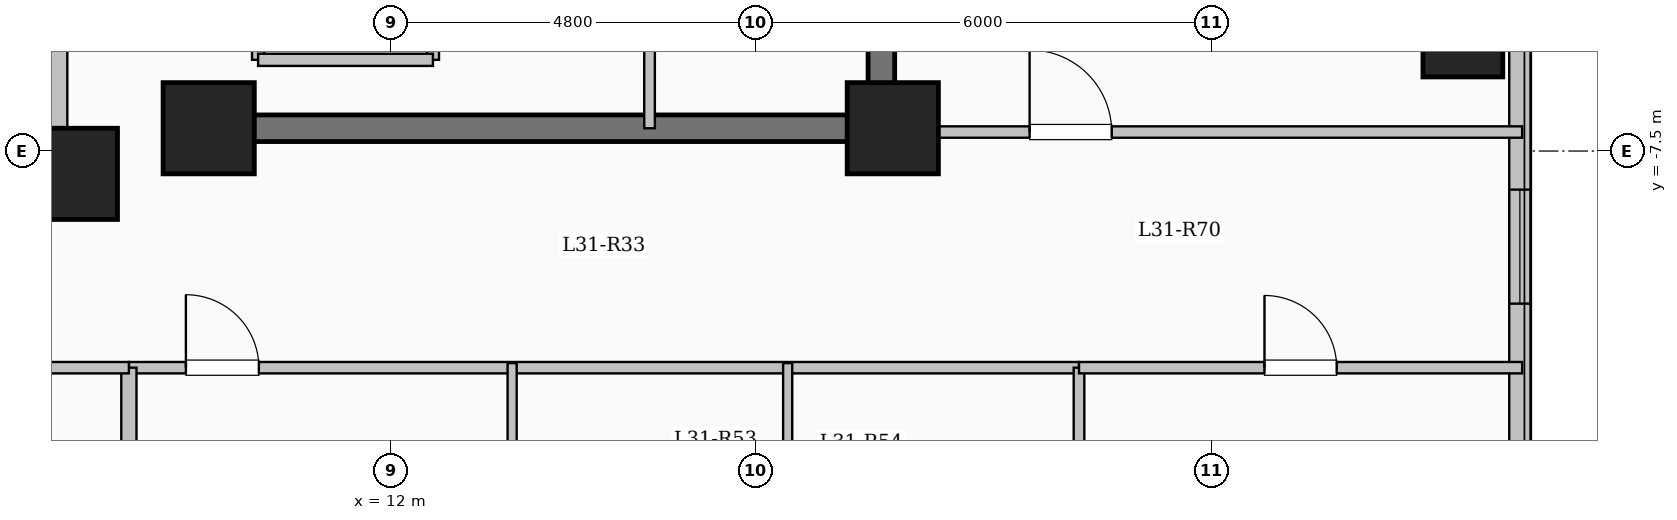
"""IFC4 building model, lengths in metres.
Left out: names, types, materials, properties, quantities, classifications, styles, units other than length and angle.
Written with IfcOpenShell. Run it as: python <this file> out.ifc"""

import sys

from ifc_helpers import new_model, si_unit, direction, frame, frame_2d, origin, origin_2d, place, context, subcontext, project, spatial, rectangle, extrude, element, fill, save


model = new_model("IFC4")
c1 = context("Model", 3, precision=1e-05, world=origin(), true_north=direction((0.0, 1.0)))
c2 = subcontext(c1, "Body", "Model", "MODEL_VIEW")
j1 = project(units=[si_unit("LENGTHUNIT", "METRE"), si_unit("PLANEANGLEUNIT", "RADIAN")], contexts=[c1])
p1 = place(None, origin())
s1 = spatial("IfcSite", under=j1, at=p1, CompositionType="ELEMENT")
p2 = place(p1, origin())
s2 = spatial("IfcBuilding", under=s1, at=p2, CompositionType="ELEMENT")
p3 = place(p2, frame((0.0, 0.0, 115.15)))
s3 = spatial("IfcBuildingStorey", under=s2, at=p3, CompositionType="ELEMENT", Elevation=115.15)
for number, where, z_axis, x_axis in (
    (1, (7.8, -7.8, 0.0), (0.0, 0.0, 1.0), (1.0, 0.0, 0.0)),
    (2, (9.6, -7.2, 0.0), (0.0, 0.0, 1.0), (1.0, 0.0, 0.0)),
    (3, (18.6, -7.2, 0.0), (0.0, 0.0, 1.0), (1.0, 0.0, 0.0)),
):
    element("IfcColumn", number, at=place(p3, frame(where, z_axis=z_axis, x_axis=x_axis)), inside=s3, PredefinedType="COLUMN", context=c2, shape_type="SweptSolid", body=[
        extrude(rectangle(XDim=1.2, YDim=1.2, at=origin_2d()), origin(), (0.0, 0.0, 1.0), 3.35),
    ])
p4 = place(p3, frame((26.1, -6.0, 0.0), z_axis=(0.0, 0.0, 1.0), x_axis=(1.0, 0.0, 0.0)))
e4 = element("IfcColumn", 4, at=p4, inside=s3, PredefinedType="COLUMN", context=c2, shape_type="SweptSolid", body=[
    extrude(rectangle(XDim=1.05, YDim=1.05, at=origin_2d()), origin(), (0.0, 0.0, 1.0), 3.35),
])
p5 = place(p3, frame((-7.62, -7.62, 0.0), z_axis=(0.0, 0.0, 1.0), x_axis=(1.0, 0.0, 0.0)))
e5 = element("IfcWall", 5, at=p5, inside=s3, PredefinedType="SOLIDWALL", context=c2, shape_type="SweptSolid", body=[
    extrude(rectangle(XDim=15.24, YDim=0.24, at=frame_2d((7.62, 0.0))), origin(), (0.0, 0.0, 1.0), 3.05),
])
p6 = place(p5, frame((6.92, 0.0, 0.95)))
e6 = element("IfcOpeningElement", 6, at=p6, cuts=e5, PredefinedType="OPENING", context=c2, shape_type="SweptSolid", body=[
    extrude(rectangle(XDim=1.4, YDim=1.5, at=frame_2d((0.7, 0.75))), frame((0.0, 0.13, 0.0), z_axis=(0.0, -1.0, 0.0), x_axis=(1.0, 0.0, 0.0)), (0.0, 0.0, 1.0), 0.26),
])
p7 = place(p3, frame((7.62, -7.62, 0.0), z_axis=(0.0, 0.0, 1.0), x_axis=(0.0, 1.0, 0.0)))
e7 = element("IfcWall", 7, at=p7, inside=s3, PredefinedType="SOLIDWALL", context=c2, shape_type="SweptSolid", body=[
    extrude(rectangle(XDim=15.24, YDim=0.24, at=frame_2d((7.62, 0.0))), origin(), (0.0, 0.0, 1.0), 3.05),
])
p8 = place(p7, frame((6.92, 0.0, 0.95)))
e8 = element("IfcOpeningElement", 8, at=p8, cuts=e7, PredefinedType="OPENING", context=c2, shape_type="SweptSolid", body=[
    extrude(rectangle(XDim=1.4, YDim=1.5, at=frame_2d((0.7, 0.75))), frame((0.0, 0.13, 0.0), z_axis=(0.0, -1.0, 0.0), x_axis=(1.0, 0.0, 0.0)), (0.0, 0.0, 1.0), 0.26),
])
p9 = place(p3, frame((26.85, 17.85, 0.0), z_axis=(0.0, 0.0, 1.0), x_axis=(0.0, -1.0, 0.0)))
e9 = element("IfcWall", 9, at=p9, inside=s3, PredefinedType="SOLIDWALL", context=c2, shape_type="SweptSolid", body=[
    extrude(rectangle(XDim=35.7, YDim=0.28, at=frame_2d((17.85, 0.0))), origin(), (0.0, 0.0, 1.0), 3.05),
])
p10 = place(p9, frame((1.675, 0.0, 0.9)))
e10 = element("IfcOpeningElement", 10, at=p10, cuts=e9, PredefinedType="OPENING", context=c2, shape_type="SweptSolid", body=[
    extrude(rectangle(XDim=2.0, YDim=1.7, at=frame_2d((1.0, 0.85))), frame((0.0, 0.15, 0.0), z_axis=(0.0, -1.0, 0.0), x_axis=(1.0, 0.0, 0.0)), (0.0, 0.0, 1.0), 0.3),
])
p11 = place(p9, frame((5.725, 0.0, 0.95)))
e11 = element("IfcOpeningElement", 11, at=p11, cuts=e9, PredefinedType="OPENING", context=c2, shape_type="SweptSolid", body=[
    extrude(rectangle(XDim=1.0, YDim=1.5, at=frame_2d((0.5, 0.75))), frame((0.0, 0.15, 0.0), z_axis=(0.0, -1.0, 0.0), x_axis=(1.0, 0.0, 0.0)), (0.0, 0.0, 1.0), 0.3),
])
p12 = place(p9, frame((15.1, 0.0, 0.9)))
e12 = element("IfcOpeningElement", 12, at=p12, cuts=e9, PredefinedType="OPENING", context=c2, shape_type="SweptSolid", body=[
    extrude(rectangle(XDim=2.0, YDim=1.7, at=frame_2d((1.0, 0.85))), frame((0.0, 0.15, 0.0), z_axis=(0.0, -1.0, 0.0), x_axis=(1.0, 0.0, 0.0)), (0.0, 0.0, 1.0), 0.3),
])
p13 = place(p9, frame((25.857, 0.0, 0.9)))
e13 = element("IfcOpeningElement", 13, at=p13, cuts=e9, PredefinedType="OPENING", context=c2, shape_type="SweptSolid", body=[
    extrude(rectangle(XDim=1.5, YDim=1.65, at=frame_2d((0.75, 0.825))), frame((0.0, 0.15, 0.0), z_axis=(0.0, -1.0, 0.0), x_axis=(1.0, 0.0, 0.0)), (0.0, 0.0, 1.0), 0.3),
])
p14 = place(p9, frame((30.75, 0.0, 0.9)))
e14 = element("IfcOpeningElement", 14, at=p14, cuts=e9, PredefinedType="OPENING", context=c2, shape_type="SweptSolid", body=[
    extrude(rectangle(XDim=2.4, YDim=1.8, at=frame_2d((1.2, 0.9))), frame((0.0, 0.15, 0.0), z_axis=(0.0, -1.0, 0.0), x_axis=(1.0, 0.0, 0.0)), (0.0, 0.0, 1.0), 0.3),
])
p15 = place(p3, frame((10.25, -6.3, 0.0), z_axis=(0.0, 0.0, 1.0), x_axis=(0.0, 1.0, 0.0)))
e15 = element("IfcWall", 15, at=p15, inside=s3, PredefinedType="SOLIDWALL", context=c2, shape_type="SweptSolid", body=[
    extrude(rectangle(XDim=2.6, YDim=0.16, at=frame_2d((1.3, 0.0))), origin(), (0.0, 0.0, 1.0), 3.05),
])
p16 = place(p15, frame((0.75, 0.0, 0.0)))
e16 = element("IfcOpeningElement", 16, at=p16, cuts=e15, PredefinedType="OPENING", context=c2, shape_type="SweptSolid", body=[
    extrude(rectangle(XDim=1.1, YDim=2.15, at=frame_2d((0.55, 1.075))), frame((0.0, 0.09, 0.0), z_axis=(0.0, -1.0, 0.0), x_axis=(1.0, 0.0, 0.0)), (0.0, 0.0, 1.0), 0.18),
])
p17 = place(p3, frame((12.55, -6.3, 0.0), z_axis=(0.0, 0.0, 1.0), x_axis=(0.0, 1.0, 0.0)))
e17 = element("IfcWall", 17, at=p17, inside=s3, PredefinedType="SOLIDWALL", context=c2, shape_type="SweptSolid", body=[
    extrude(rectangle(XDim=2.6, YDim=0.16, at=frame_2d((1.3, 0.0))), origin(), (0.0, 0.0, 1.0), 3.05),
])
p18 = place(p3, frame((10.25, -6.3, 0.0), z_axis=(0.0, 0.0, 1.0), x_axis=(1.0, 0.0, 0.0)))
e18 = element("IfcWall", 18, at=p18, inside=s3, PredefinedType="SOLIDWALL", context=c2, shape_type="SweptSolid", body=[
    extrude(rectangle(XDim=2.3, YDim=0.16, at=frame_2d((1.15, 0.0))), origin(), (0.0, 0.0, 1.0), 3.05),
])
p19 = place(p3, frame((18.45, -7.375, 0.0), z_axis=(0.0, 0.0, 1.0), x_axis=(0.0, 1.0, 0.0)))
e19 = element("IfcWall", 19, at=p19, inside=s3, PredefinedType="SHEAR", context=c2, shape_type="SweptSolid", body=[
    extrude(rectangle(XDim=14.05, YDim=0.35, at=frame_2d((7.025, 0.0))), origin(), (0.0, 0.0, 1.0), 3.35),
])
p20 = place(p3, frame((10.075, -7.2, 0.0), z_axis=(0.0, 0.0, 1.0), x_axis=(1.0, 0.0, 0.0)))
e20 = element("IfcWall", 20, at=p20, inside=s3, PredefinedType="SHEAR", context=c2, shape_type="SweptSolid", body=[
    extrude(rectangle(XDim=8.55, YDim=0.35, at=frame_2d((4.275, 0.0))), origin(), (0.0, 0.0, 1.0), 3.35),
])
p21 = place(p3, frame((15.4, -7.2, 0.0), z_axis=(0.0, 0.0, 1.0), x_axis=(0.0, 1.0, 0.0)))
e21 = element("IfcWall", 21, at=p21, inside=s3, PredefinedType="PARTITIONING", context=c2, shape_type="SweptSolid", body=[
    extrude(rectangle(XDim=10.45, YDim=0.14, at=frame_2d((5.225, 0.0))), origin(), (0.0, 0.0, 1.0), 3.05),
])
p22 = place(p21, frame((9.25, 0.0, 0.0)))
e22 = element("IfcOpeningElement", 22, at=p22, cuts=e21, PredefinedType="OPENING", context=c2, shape_type="SweptSolid", body=[
    extrude(rectangle(XDim=0.9, YDim=2.08, at=frame_2d((0.45, 1.04))), frame((0.0, 0.08, 0.0), z_axis=(0.0, -1.0, 0.0), x_axis=(1.0, 0.0, 0.0)), (0.0, 0.0, 1.0), 0.16),
])
p23 = place(p3, frame((8.55, -10.35, 0.0), z_axis=(0.0, 0.0, 1.0), x_axis=(1.0, 0.0, 0.0)))
e23 = element("IfcWall", 23, at=p23, inside=s3, PredefinedType="PARTITIONING", context=c2, shape_type="SweptSolid", body=[
    extrude(rectangle(XDim=12.5, YDim=0.15, at=frame_2d((6.25, 0.0))), origin(), (0.0, 0.0, 1.0), 3.05),
])
p24 = place(p23, frame((0.75, 0.0, 0.0)))
e24 = element("IfcOpeningElement", 24, at=p24, cuts=e23, PredefinedType="OPENING", context=c2, shape_type="SweptSolid", body=[
    extrude(rectangle(XDim=0.96, YDim=2.15, at=frame_2d((0.48, 1.075))), frame((0.0, 0.085, 0.0), z_axis=(0.0, -1.0, 0.0), x_axis=(1.0, 0.0, 0.0)), (0.0, 0.0, 1.0), 0.17),
])
p25 = place(p3, frame((13.592, -22.1, 0.0), z_axis=(0.0, 0.0, 1.0), x_axis=(0.0, 1.0, 0.0)))
e25 = element("IfcWall", 25, at=p25, inside=s3, PredefinedType="PARTITIONING", context=c2, shape_type="SweptSolid", body=[
    extrude(rectangle(XDim=11.81, YDim=0.12, at=frame_2d((5.905, 0.0))), origin(), (0.0, 0.0, 1.0), 3.05),
])
p26 = place(p25, frame((7.475, 0.0, 0.0)))
e26 = element("IfcOpeningElement", 26, at=p26, cuts=e25, PredefinedType="OPENING", context=c2, shape_type="SweptSolid", body=[
    extrude(rectangle(XDim=1.08, YDim=2.15, at=frame_2d((0.54, 1.075))), frame((0.0, 0.07, 0.0), z_axis=(0.0, -1.0, 0.0), x_axis=(1.0, 0.0, 0.0)), (0.0, 0.0, 1.0), 0.14),
])
p27 = place(p3, frame((17.217, -13.26, 0.0), z_axis=(0.0, 0.0, 1.0), x_axis=(0.0, 1.0, 0.0)))
e27 = element("IfcWall", 27, at=p27, inside=s3, PredefinedType="PARTITIONING", context=c2, shape_type="SweptSolid", body=[
    extrude(rectangle(XDim=2.97, YDim=0.12, at=frame_2d((1.485, 0.0))), origin(), (0.0, 0.0, 1.0), 3.05),
])
p28 = place(p3, frame((8.55, -22.704, 0.0), z_axis=(0.0, 0.0, 1.0), x_axis=(0.0, 1.0, 0.0)))
e28 = element("IfcWall", 28, at=p28, inside=s3, PredefinedType="SOLIDWALL", context=c2, shape_type="SweptSolid", body=[
    extrude(rectangle(XDim=12.354, YDim=0.2, at=frame_2d((6.177, 0.0))), origin(), (0.0, 0.0, 1.0), 3.05),
])
p29 = place(p3, frame((-8.55, -10.35, 0.0), z_axis=(0.0, 0.0, 1.0), x_axis=(1.0, 0.0, 0.0)))
e29 = element("IfcWall", 29, at=p29, inside=s3, PredefinedType="PARTITIONING", context=c2, shape_type="SweptSolid", body=[
    extrude(rectangle(XDim=17.1, YDim=0.15, at=frame_2d((8.55, 0.0))), origin(), (0.0, 0.0, 1.0), 3.05),
])
p30 = place(p29, frame((1.15, 0.0, 0.0)))
e30 = element("IfcOpeningElement", 30, at=p30, cuts=e29, PredefinedType="OPENING", context=c2, shape_type="SweptSolid", body=[
    extrude(rectangle(XDim=0.96, YDim=2.15, at=frame_2d((0.48, 1.075))), frame((0.0, 0.085, 0.0), z_axis=(0.0, -1.0, 0.0), x_axis=(1.0, 0.0, 0.0)), (0.0, 0.0, 1.0), 0.17),
])
p31 = place(p29, frame((10.5, 0.0, 0.0)))
e31 = element("IfcOpeningElement", 31, at=p31, cuts=e29, PredefinedType="OPENING", context=c2, shape_type="SweptSolid", body=[
    extrude(rectangle(XDim=0.96, YDim=2.15, at=frame_2d((0.48, 1.075))), frame((0.0, 0.085, 0.0), z_axis=(0.0, -1.0, 0.0), x_axis=(1.0, 0.0, 0.0)), (0.0, 0.0, 1.0), 0.17),
])
p32 = place(p3, frame((18.45, -7.25, 0.0), z_axis=(0.0, 0.0, 1.0), x_axis=(1.0, 0.0, 0.0)))
e32 = element("IfcWall", 32, at=p32, inside=s3, PredefinedType="PARTITIONING", context=c2, shape_type="SweptSolid", body=[
    extrude(rectangle(XDim=8.43, YDim=0.15, at=frame_2d((4.215, 0.0))), origin(), (0.0, 0.0, 1.0), 3.05),
])
p33 = place(p32, frame((1.95, 0.0, 0.0)))
e33 = element("IfcOpeningElement", 33, at=p33, cuts=e32, PredefinedType="OPENING", context=c2, shape_type="SweptSolid", body=[
    extrude(rectangle(XDim=1.08, YDim=2.15, at=frame_2d((0.54, 1.075))), frame((0.0, 0.085, 0.0), z_axis=(0.0, -1.0, 0.0), x_axis=(1.0, 0.0, 0.0)), (0.0, 0.0, 1.0), 0.17),
])
p34 = place(p3, frame((21.05, -17.85, 0.0), z_axis=(0.0, 0.0, 1.0), x_axis=(0.0, 1.0, 0.0)))
e34 = element("IfcWall", 34, at=p34, inside=s3, PredefinedType="PARTITIONING", context=c2, shape_type="SweptSolid", body=[
    extrude(rectangle(XDim=7.5, YDim=0.14, at=frame_2d((3.75, 0.0))), origin(), (0.0, 0.0, 1.0), 3.05),
])
p35 = place(p3, frame((21.05, -10.35, 0.0), z_axis=(0.0, 0.0, 1.0), x_axis=(1.0, 0.0, 0.0)))
e35 = element("IfcWall", 35, at=p35, inside=s3, PredefinedType="PARTITIONING", context=c2, shape_type="SweptSolid", body=[
    extrude(rectangle(XDim=5.83, YDim=0.15, at=frame_2d((2.915, 0.0))), origin(), (0.0, 0.0, 1.0), 3.05),
])
p36 = place(p35, frame((2.44, 0.0, 0.0)))
e36 = element("IfcOpeningElement", 36, at=p36, cuts=e35, PredefinedType="OPENING", context=c2, shape_type="SweptSolid", body=[
    extrude(rectangle(XDim=0.95, YDim=2.15, at=frame_2d((0.475, 1.075))), frame((0.0, 0.085, 0.0), z_axis=(0.0, -1.0, 0.0), x_axis=(1.0, 0.0, 0.0)), (0.0, 0.0, 1.0), 0.17),
])
p37 = place(p13, origin())
e37 = element("IfcWindow", 37, at=p37, inside=s3, PartitioningType="SINGLE_PANEL", PredefinedType="WINDOW", context=c2, shape_type="SweptSolid", body=[
    extrude(rectangle(XDim=1.5, YDim=1.65, at=frame_2d((0.75, 0.825))), frame((0.0, 0.03, 0.0), z_axis=(0.0, -1.0, 0.0), x_axis=(1.0, 0.0, 0.0)), (0.0, 0.0, 1.0), 0.06),
])
fill(e13, e37)
p38 = place(p24, origin())
e38 = element("IfcDoor", 38, at=p38, inside=s3, OperationType="SINGLE_SWING_LEFT", PredefinedType="DOOR", context=c2, shape_type="SweptSolid", body=[
    extrude(rectangle(XDim=0.96, YDim=2.15, at=frame_2d((0.48, 1.075))), frame((0.0, 0.025, 0.0), z_axis=(0.0, -1.0, 0.0), x_axis=(1.0, 0.0, 0.0)), (0.0, 0.0, 1.0), 0.05),
])
fill(e24, e38)
p39 = place(p36, origin())
e39 = element("IfcDoor", 39, at=p39, inside=s3, OperationType="SINGLE_SWING_LEFT", PredefinedType="DOOR", context=c2, shape_type="SweptSolid", body=[
    extrude(rectangle(XDim=0.95, YDim=2.15, at=frame_2d((0.475, 1.075))), frame((0.0, 0.025, 0.0), z_axis=(0.0, -1.0, 0.0), x_axis=(1.0, 0.0, 0.0)), (0.0, 0.0, 1.0), 0.05),
])
fill(e36, e39)
p40 = place(p33, origin())
e40 = element("IfcDoor", 40, at=p40, inside=s3, OperationType="SINGLE_SWING_LEFT", PredefinedType="DOOR", context=c2, shape_type="SweptSolid", body=[
    extrude(rectangle(XDim=1.08, YDim=2.15, at=frame_2d((0.54, 1.075))), frame((0.0, 0.025, 0.0), z_axis=(0.0, -1.0, 0.0), x_axis=(1.0, 0.0, 0.0)), (0.0, 0.0, 1.0), 0.05),
])
fill(e33, e40)
save(model, sys.argv[1])
